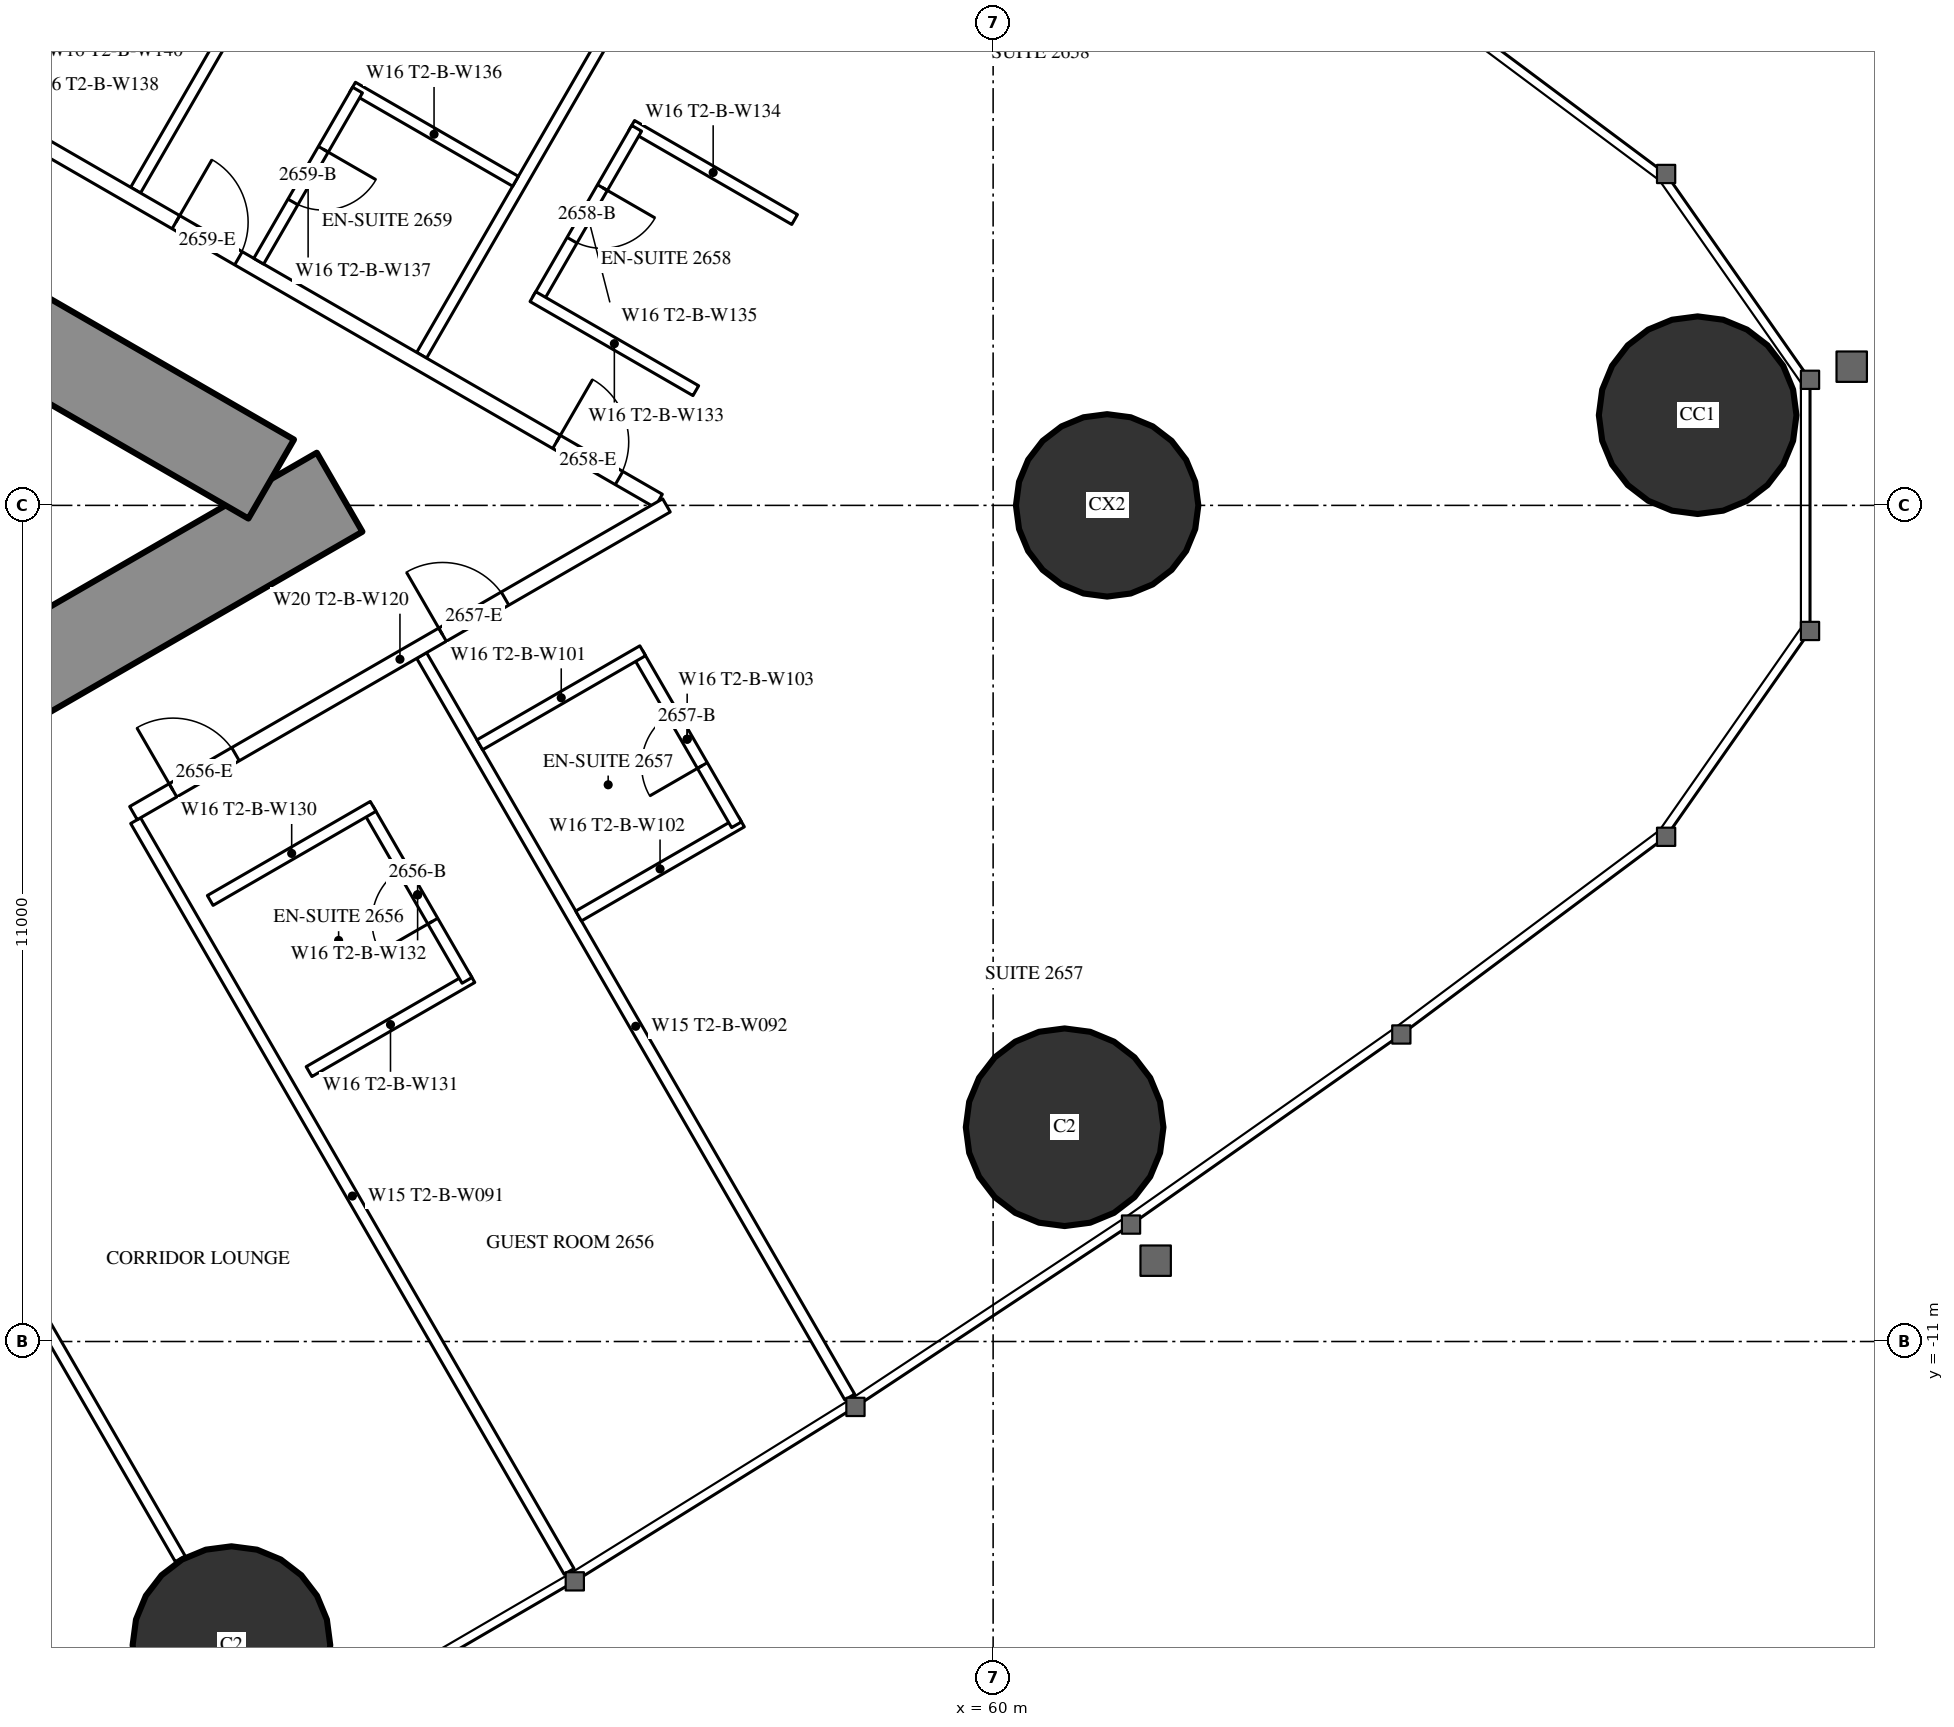
"""IFC4 building model, lengths in metres.
Left out: names, types, materials, properties, quantities, classifications, styles, units other than length and angle.
Written with IfcOpenShell. Run it as: python <this file> out.ifc"""

import sys

from ifc_helpers import new_model, si_unit, direction, frame, frame_2d, origin, origin_2d, place, context, subcontext, project, spatial, rectangle, circle, hollow_circle, extrude, element, fill, save


model = new_model("IFC4")
c1 = context("Model", 3, precision=1e-05, world=origin(), true_north=direction((0.0, 1.0)))
c2 = subcontext(c1, "Body", "Model", "MODEL_VIEW")
j1 = project(units=[si_unit("LENGTHUNIT", "METRE"), si_unit("PLANEANGLEUNIT", "RADIAN")], contexts=[c1])
p1 = place(None, origin())
s1 = spatial("IfcSite", under=j1, at=p1, CompositionType="ELEMENT")
p2 = place(p1, origin())
s2 = spatial("IfcBuilding", under=s1, at=p2, CompositionType="ELEMENT")
p3 = place(p2, frame((0.0, 0.0, 101.1)))
s3 = spatial("IfcBuildingStorey", under=s2, at=p3, CompositionType="ELEMENT", Elevation=101.1)
for number, where, z_axis, x_axis in (
    (1, (69.269, 1.187, 0.0), (0.0, 0.0, 1.0), (1.0, 0.0, 0.0)),
    (2, (49.979, -14.994, 0.0), (0.0, 0.0, 1.0), (1.0, 0.0, 0.0)),
    (3, (60.941, -8.181, 0.0), (0.0, 0.0, 1.0), (1.0, 0.0, 0.0)),
):
    element("IfcColumn", number, at=place(p3, frame(where, z_axis=z_axis, x_axis=x_axis)), inside=s3, PredefinedType="COLUMN", context=c2, shape_type="SweptSolid", body=[
        extrude(hollow_circle(Radius=1.3, WallThickness=0.1, at=origin_2d()), origin(), (0.0, 0.0, 1.0), 3.5),
    ])
p4 = place(p3, frame((61.5, 0.0, 0.0), z_axis=(0.0, 0.0, 1.0), x_axis=(1.0, 0.0, 0.0)))
e4 = element("IfcColumn", 4, at=p4, inside=s3, PredefinedType="COLUMN", context=c2, shape_type="SweptSolid", body=[
    extrude(circle(Radius=1.2, at=origin_2d()), origin(), (0.0, 0.0, 1.0), 3.5),
])
p5 = place(p3, frame((27.2, -13.8, 0.0), z_axis=(0.0, 0.0, 1.0), x_axis=(0.866027159892, 0.499996958321, 0.0)))
e5 = element("IfcWall", 5, at=p5, inside=s3, PredefinedType="SHEAR", context=c2, shape_type="SweptSolid", body=[
    extrude(rectangle(XDim=27.947, YDim=1.2, at=frame_2d((13.973, 0.0))), origin(), (0.0, 0.0, 1.0), 3.5),
])
p6 = place(p5, frame((4.6, 0.0, 0.0)))
e6 = element("IfcOpeningElement", 6, at=p6, cuts=e5, PredefinedType="OPENING", context=c2, shape_type="SweptSolid", body=[
    extrude(rectangle(XDim=1.0, YDim=2.2, at=frame_2d((0.5, 1.1))), frame((0.0, 0.61, 0.0), z_axis=(0.0, -1.0, 0.0), x_axis=(1.0, 0.0, 0.0)), (0.0, 0.0, 1.0), 1.22),
])
p7 = place(p5, frame((13.395, 0.0, 0.0)))
e7 = element("IfcOpeningElement", 7, at=p7, cuts=e5, PredefinedType="OPENING", context=c2, shape_type="SweptSolid", body=[
    extrude(rectangle(XDim=1.8, YDim=2.2, at=frame_2d((0.9, 1.1))), frame((0.0, 0.61, 0.0), z_axis=(0.0, -1.0, 0.0), x_axis=(1.0, 0.0, 0.0)), (0.0, 0.0, 1.0), 1.22),
])
p8 = place(p3, frame((27.2, 13.8, 0.0), z_axis=(0.0, 0.0, 1.0), x_axis=(0.866024515034, -0.500001539357, 0.0)))
e8 = element("IfcWall", 8, at=p8, inside=s3, PredefinedType="SHEAR", context=c2, shape_type="SweptSolid", body=[
    extrude(rectangle(XDim=26.907, YDim=1.2, at=frame_2d((13.454, 0.0))), origin(), (0.0, 0.0, 1.0), 3.5),
])
p9 = place(p8, frame((4.6, 0.0, 0.0)))
e9 = element("IfcOpeningElement", 9, at=p9, cuts=e8, PredefinedType="OPENING", context=c2, shape_type="SweptSolid", body=[
    extrude(rectangle(XDim=1.0, YDim=2.2, at=frame_2d((0.5, 1.1))), frame((0.0, 0.61, 0.0), z_axis=(0.0, -1.0, 0.0), x_axis=(1.0, 0.0, 0.0)), (0.0, 0.0, 1.0), 1.22),
])
p10 = place(p8, frame((13.395, 0.0, 0.0)))
e10 = element("IfcOpeningElement", 10, at=p10, cuts=e8, PredefinedType="OPENING", context=c2, shape_type="SweptSolid", body=[
    extrude(rectangle(XDim=1.8, YDim=2.2, at=frame_2d((0.9, 1.1))), frame((0.0, 0.61, 0.0), z_axis=(0.0, -1.0, 0.0), x_axis=(1.0, 0.0, 0.0)), (0.0, 0.0, 1.0), 1.22),
])
p11 = place(p3, frame((44.954, -6.321, 0.0), z_axis=(0.0, 0.0, 1.0), x_axis=(0.500018676722, -0.866014620505, 0.0)))
e11 = element("IfcWall", 11, at=p11, inside=s3, PredefinedType="PARTITIONING", context=c2, shape_type="SweptSolid", body=[
    extrude(rectangle(XDim=8.704, YDim=0.15, at=frame_2d((4.352, 0.0))), origin(), (0.0, 0.0, 1.0), 2.2),
])
p12 = place(p3, frame((48.719, -4.147, 0.0), z_axis=(0.0, 0.0, 1.0), x_axis=(0.499990498062, -0.866030889661, 0.0)))
e12 = element("IfcWall", 12, at=p12, inside=s3, PredefinedType="PARTITIONING", context=c2, shape_type="SweptSolid", body=[
    extrude(rectangle(XDim=11.406, YDim=0.15, at=frame_2d((5.703, 0.0))), origin(), (0.0, 0.0, 1.0), 3.25),
])
p13 = place(p3, frame((52.481, -1.975, 0.0), z_axis=(0.0, 0.0, 1.0), x_axis=(0.500003867771, -0.866023170714, 0.0)))
e13 = element("IfcWall", 13, at=p13, inside=s3, PredefinedType="PARTITIONING", context=c2, shape_type="SweptSolid", body=[
    extrude(rectangle(XDim=11.265, YDim=0.15, at=frame_2d((5.632, 0.0))), origin(), (0.0, 0.0, 1.0), 3.25),
])
p14 = place(p3, frame((48.719, 4.147, 0.0), z_axis=(0.0, 0.0, 1.0), x_axis=(0.499993328235, 0.866029255696, 0.0)))
e14 = element("IfcWall", 14, at=p14, inside=s3, PredefinedType="PARTITIONING", context=c2, shape_type="SweptSolid", body=[
    extrude(rectangle(XDim=8.686, YDim=0.15, at=frame_2d((4.343, 0.0))), origin(), (0.0, 0.0, 1.0), 2.2),
])
p15 = place(p3, frame((52.481, 1.975, 0.0), z_axis=(0.0, 0.0, 1.0), x_axis=(0.500003867771, 0.866023170714, 0.0)))
e15 = element("IfcWall", 15, at=p15, inside=s3, PredefinedType="PARTITIONING", context=c2, shape_type="SweptSolid", body=[
    extrude(rectangle(XDim=11.265, YDim=0.15, at=frame_2d((5.632, 0.0))), origin(), (0.0, 0.0, 1.0), 3.25),
])
p16 = place(p3, frame((36.834, 10.894, 0.0), z_axis=(0.0, 0.0, 1.0), x_axis=(0.866028157229, -0.499995230863, 0.0)))
e16 = element("IfcWall", 16, at=p16, inside=s3, PredefinedType="PARTITIONING", context=c2, shape_type="SweptSolid", body=[
    extrude(rectangle(XDim=21.667, YDim=0.2, at=frame_2d((10.833, 0.0))), origin(), (0.0, 0.0, 1.0), 3.25),
])
p17 = place(p16, frame((20.117, 0.0, 0.0)))
e17 = element("IfcOpeningElement", 17, at=p17, cuts=e16, PredefinedType="OPENING", context=c2, shape_type="SweptSolid", body=[
    extrude(rectangle(XDim=0.95, YDim=2.2, at=frame_2d((0.475, 1.1))), frame((0.0, 0.11, 0.0), z_axis=(0.0, -1.0, 0.0), x_axis=(1.0, 0.0, 0.0)), (0.0, 0.0, 1.0), 0.22),
])
p18 = place(p16, frame((14.335, 0.0, 0.0)))
e18 = element("IfcOpeningElement", 18, at=p18, cuts=e16, PredefinedType="OPENING", context=c2, shape_type="SweptSolid", body=[
    extrude(rectangle(XDim=0.95, YDim=2.2, at=frame_2d((0.475, 1.1))), frame((0.0, 0.11, 0.0), z_axis=(0.0, -1.0, 0.0), x_axis=(1.0, 0.0, 0.0)), (0.0, 0.0, 1.0), 0.22),
])
p19 = place(p16, frame((9.693, 0.0, 0.0)))
e19 = element("IfcOpeningElement", 19, at=p19, cuts=e16, PredefinedType="OPENING", context=c2, shape_type="SweptSolid", body=[
    extrude(rectangle(XDim=0.95, YDim=2.2, at=frame_2d((0.475, 1.1))), frame((0.0, 0.11, 0.0), z_axis=(0.0, -1.0, 0.0), x_axis=(1.0, 0.0, 0.0)), (0.0, 0.0, 1.0), 0.22),
])
p20 = place(p16, frame((2.95, 0.0, 0.0)))
e20 = element("IfcOpeningElement", 20, at=p20, cuts=e16, PredefinedType="OPENING", context=c2, shape_type="SweptSolid", body=[
    extrude(rectangle(XDim=0.95, YDim=2.2, at=frame_2d((0.475, 1.1))), frame((0.0, 0.11, 0.0), z_axis=(0.0, -1.0, 0.0), x_axis=(1.0, 0.0, 0.0)), (0.0, 0.0, 1.0), 0.22),
])
p21 = place(p3, frame((48.69, -4.048, 0.0), z_axis=(0.0, 0.0, 1.0), x_axis=(0.866026410209, 0.499998256818, 0.0)))
e21 = element("IfcWall", 21, at=p21, inside=s3, PredefinedType="PARTITIONING", context=c2, shape_type="SweptSolid", body=[
    extrude(rectangle(XDim=8.097, YDim=0.2, at=frame_2d((4.048, 0.0))), origin(), (0.0, 0.0, 1.0), 3.25),
])
p22 = place(p21, frame((0.6, 0.0, 0.0)))
e22 = element("IfcOpeningElement", 22, at=p22, cuts=e21, PredefinedType="OPENING", context=c2, shape_type="SweptSolid", body=[
    extrude(rectangle(XDim=0.95, YDim=2.2, at=frame_2d((0.475, 1.1))), frame((0.0, 0.11, 0.0), z_axis=(0.0, -1.0, 0.0), x_axis=(1.0, 0.0, 0.0)), (0.0, 0.0, 1.0), 0.22),
])
p23 = place(p21, frame((4.695, 0.0, 0.0)))
e23 = element("IfcOpeningElement", 23, at=p23, cuts=e21, PredefinedType="OPENING", context=c2, shape_type="SweptSolid", body=[
    extrude(rectangle(XDim=0.95, YDim=2.2, at=frame_2d((0.475, 1.1))), frame((0.0, 0.11, 0.0), z_axis=(0.0, -1.0, 0.0), x_axis=(1.0, 0.0, 0.0)), (0.0, 0.0, 1.0), 0.22),
])
p24 = place(p3, frame((51.0, -7.449, 0.0), z_axis=(0.0, 0.0, 1.0), x_axis=(0.866006523861, 0.500032699561, 0.0)))
e24 = element("IfcWall", 24, at=p24, inside=s3, PredefinedType="PARTITIONING", context=c2, shape_type="SweptSolid", body=[
    extrude(rectangle(XDim=2.475, YDim=0.15, at=frame_2d((1.237, 0.0))), origin(), (0.0, 0.0, 1.0), 3.25),
])
p25 = place(p3, frame((51.778, -3.998, 0.0), z_axis=(0.0, 0.0, 1.0), x_axis=(0.500047596559, -0.865997922154, 0.0)))
e25 = element("IfcWall", 25, at=p25, inside=s3, PredefinedType="PARTITIONING", context=c2, shape_type="SweptSolid", body=[
    extrude(rectangle(XDim=2.6, YDim=0.15, at=frame_2d((1.3, 0.0))), origin(), (0.0, 0.0, 1.0), 3.25),
])
p26 = place(p25, frame((0.9, 0.0, 0.0)))
e26 = element("IfcOpeningElement", 26, at=p26, cuts=e25, PredefinedType="OPENING", context=c2, shape_type="SweptSolid", body=[
    extrude(rectangle(XDim=0.8, YDim=2.2, at=frame_2d((0.4, 1.1))), frame((0.0, 0.085, 0.0), z_axis=(0.0, -1.0, 0.0), x_axis=(1.0, 0.0, 0.0)), (0.0, 0.0, 1.0), 0.17),
])
for number, where, z_axis, x_axis in (
    (27, (49.7, -5.198, 0.0), (0.0, 0.0, 1.0), (0.866, 0.5, 0.0)),
    (28, (54.546, -5.402, 0.0), (0.0, 0.0, 1.0), (0.866, 0.5, 0.0)),
):
    element("IfcWall", number, at=place(p3, frame(where, z_axis=z_axis, x_axis=x_axis)), inside=s3, PredefinedType="PARTITIONING", context=c2, shape_type="SweptSolid", body=[
        extrude(rectangle(XDim=2.475, YDim=0.15, at=frame_2d((1.237, 0.0))), origin(), (0.0, 0.0, 1.0), 3.25),
    ])
p27 = place(p3, frame((55.325, -1.95, 0.0), z_axis=(0.0, 0.0, 1.0), x_axis=(0.500006934395, -0.866021400173, 0.0)))
e29 = element("IfcWall", 29, at=p27, inside=s3, PredefinedType="PARTITIONING", context=c2, shape_type="SweptSolid", body=[
    extrude(rectangle(XDim=2.6, YDim=0.15, at=frame_2d((1.3, 0.0))), origin(), (0.0, 0.0, 1.0), 3.25),
])
p28 = place(p27, frame((0.9, 0.0, 0.0)))
e30 = element("IfcOpeningElement", 30, at=p28, cuts=e29, PredefinedType="OPENING", context=c2, shape_type="SweptSolid", body=[
    extrude(rectangle(XDim=0.8, YDim=2.2, at=frame_2d((0.4, 1.1))), frame((0.0, 0.085, 0.0), z_axis=(0.0, -1.0, 0.0), x_axis=(1.0, 0.0, 0.0)), (0.0, 0.0, 1.0), 0.17),
])
for number, where, z_axis, x_axis in (
    (31, (53.246, -3.15, 0.0), (0.0, 0.0, 1.0), (0.866, 0.5, 0.0)),
    (32, (55.245, 4.998, 0.0), (0.0, 0.0, 1.0), (0.866, -0.5, 0.0)),
):
    element("IfcWall", number, at=place(p3, frame(where, z_axis=z_axis, x_axis=x_axis)), inside=s3, PredefinedType="PARTITIONING", context=c2, shape_type="SweptSolid", body=[
        extrude(rectangle(XDim=2.475, YDim=0.15, at=frame_2d((1.237, 0.0))), origin(), (0.0, 0.0, 1.0), 3.25),
    ])
p29 = place(p3, frame((54.01, 2.709, 0.0), z_axis=(0.0, 0.0, 1.0), x_axis=(0.500006934395, 0.866021400173, 0.0)))
e33 = element("IfcWall", 33, at=p29, inside=s3, PredefinedType="PARTITIONING", context=c2, shape_type="SweptSolid", body=[
    extrude(rectangle(XDim=2.6, YDim=0.15, at=frame_2d((1.3, 0.0))), origin(), (0.0, 0.0, 1.0), 3.25),
])
p30 = place(p29, frame((0.9, 0.0, 0.0)))
e34 = element("IfcOpeningElement", 34, at=p30, cuts=e33, PredefinedType="OPENING", context=c2, shape_type="SweptSolid", body=[
    extrude(rectangle(XDim=0.8, YDim=2.2, at=frame_2d((0.4, 1.1))), frame((0.0, 0.085, 0.0), z_axis=(0.0, -1.0, 0.0), x_axis=(1.0, 0.0, 0.0)), (0.0, 0.0, 1.0), 0.17),
])
p31 = place(p3, frame((53.945, 2.747, 0.0), z_axis=(0.0, 0.0, 1.0), x_axis=(0.866031185235, -0.4999899861, 0.0)))
e35 = element("IfcWall", 35, at=p31, inside=s3, PredefinedType="PARTITIONING", context=c2, shape_type="SweptSolid", body=[
    extrude(rectangle(XDim=2.475, YDim=0.15, at=frame_2d((1.238, 0.0))), origin(), (0.0, 0.0, 1.0), 3.25),
])
p32 = place(p3, frame((51.573, 5.502, 0.0), z_axis=(0.0, 0.0, 1.0), x_axis=(0.866006523861, -0.500032699561, 0.0)))
e36 = element("IfcWall", 36, at=p32, inside=s3, PredefinedType="PARTITIONING", context=c2, shape_type="SweptSolid", body=[
    extrude(rectangle(XDim=2.475, YDim=0.15, at=frame_2d((1.237, 0.0))), origin(), (0.0, 0.0, 1.0), 3.25),
])
p33 = place(p3, frame((50.338, 3.213, 0.0), z_axis=(0.0, 0.0, 1.0), x_axis=(0.500047596559, 0.865997922154, 0.0)))
e37 = element("IfcWall", 37, at=p33, inside=s3, PredefinedType="PARTITIONING", context=c2, shape_type="SweptSolid", body=[
    extrude(rectangle(XDim=2.6, YDim=0.15, at=frame_2d((1.3, 0.0))), origin(), (0.0, 0.0, 1.0), 3.25),
])
p34 = place(p33, frame((0.9, 0.0, 0.0)))
e38 = element("IfcOpeningElement", 38, at=p34, cuts=e37, PredefinedType="OPENING", context=c2, shape_type="SweptSolid", body=[
    extrude(rectangle(XDim=0.8, YDim=2.2, at=frame_2d((0.4, 1.1))), frame((0.0, 0.085, 0.0), z_axis=(0.0, -1.0, 0.0), x_axis=(1.0, 0.0, 0.0)), (0.0, 0.0, 1.0), 0.17),
])
p35 = place(p26, origin())
e39 = element("IfcDoor", 39, at=p35, inside=s3, OperationType="SINGLE_SWING_RIGHT", PredefinedType="DOOR", context=c2, shape_type="SweptSolid", body=[
    extrude(rectangle(XDim=0.8, YDim=2.2, at=frame_2d((0.4, 1.1))), frame((0.0, 0.025, 0.0), z_axis=(0.0, -1.0, 0.0), x_axis=(1.0, 0.0, 0.0)), (0.0, 0.0, 1.0), 0.05),
])
fill(e26, e39)
p36 = place(p22, origin())
e40 = element("IfcDoor", 40, at=p36, inside=s3, OperationType="SINGLE_SWING_LEFT", PredefinedType="DOOR", context=c2, shape_type="SweptSolid", body=[
    extrude(rectangle(XDim=0.95, YDim=2.2, at=frame_2d((0.475, 1.1))), frame((0.0, 0.025, 0.0), z_axis=(0.0, -1.0, 0.0), x_axis=(1.0, 0.0, 0.0)), (0.0, 0.0, 1.0), 0.05),
])
fill(e22, e40)
p37 = place(p28, origin())
e41 = element("IfcDoor", 41, at=p37, inside=s3, OperationType="SINGLE_SWING_RIGHT", PredefinedType="DOOR", context=c2, shape_type="SweptSolid", body=[
    extrude(rectangle(XDim=0.8, YDim=2.2, at=frame_2d((0.4, 1.1))), frame((0.0, 0.025, 0.0), z_axis=(0.0, -1.0, 0.0), x_axis=(1.0, 0.0, 0.0)), (0.0, 0.0, 1.0), 0.05),
])
fill(e30, e41)
p38 = place(p23, origin())
e42 = element("IfcDoor", 42, at=p38, inside=s3, OperationType="SINGLE_SWING_LEFT", PredefinedType="DOOR", context=c2, shape_type="SweptSolid", body=[
    extrude(rectangle(XDim=0.95, YDim=2.2, at=frame_2d((0.475, 1.1))), frame((0.0, 0.025, 0.0), z_axis=(0.0, -1.0, 0.0), x_axis=(1.0, 0.0, 0.0)), (0.0, 0.0, 1.0), 0.05),
])
fill(e23, e42)
p39 = place(p30, origin())
e43 = element("IfcDoor", 43, at=p39, inside=s3, OperationType="SINGLE_SWING_RIGHT", PredefinedType="DOOR", context=c2, shape_type="SweptSolid", body=[
    extrude(rectangle(XDim=0.8, YDim=2.2, at=frame_2d((0.4, 1.1))), frame((0.0, 0.025, 0.0), z_axis=(0.0, -1.0, 0.0), x_axis=(1.0, 0.0, 0.0)), (0.0, 0.0, 1.0), 0.05),
])
fill(e34, e43)
p40 = place(p17, origin())
e44 = element("IfcDoor", 44, at=p40, inside=s3, OperationType="SINGLE_SWING_LEFT", PredefinedType="DOOR", context=c2, shape_type="SweptSolid", body=[
    extrude(rectangle(XDim=0.95, YDim=2.2, at=frame_2d((0.475, 1.1))), frame((0.0, 0.025, 0.0), z_axis=(0.0, -1.0, 0.0), x_axis=(1.0, 0.0, 0.0)), (0.0, 0.0, 1.0), 0.05),
])
fill(e17, e44)
p41 = place(p34, origin())
e45 = element("IfcDoor", 45, at=p41, inside=s3, OperationType="SINGLE_SWING_RIGHT", PredefinedType="DOOR", context=c2, shape_type="SweptSolid", body=[
    extrude(rectangle(XDim=0.8, YDim=2.2, at=frame_2d((0.4, 1.1))), frame((0.0, 0.025, 0.0), z_axis=(0.0, -1.0, 0.0), x_axis=(1.0, 0.0, 0.0)), (0.0, 0.0, 1.0), 0.05),
])
fill(e38, e45)
p42 = place(p18, origin())
e46 = element("IfcDoor", 46, at=p42, inside=s3, OperationType="SINGLE_SWING_LEFT", PredefinedType="DOOR", context=c2, shape_type="SweptSolid", body=[
    extrude(rectangle(XDim=0.95, YDim=2.2, at=frame_2d((0.475, 1.1))), frame((0.0, 0.025, 0.0), z_axis=(0.0, -1.0, 0.0), x_axis=(1.0, 0.0, 0.0)), (0.0, 0.0, 1.0), 0.05),
])
fill(e18, e46)
save(model, sys.argv[1])
